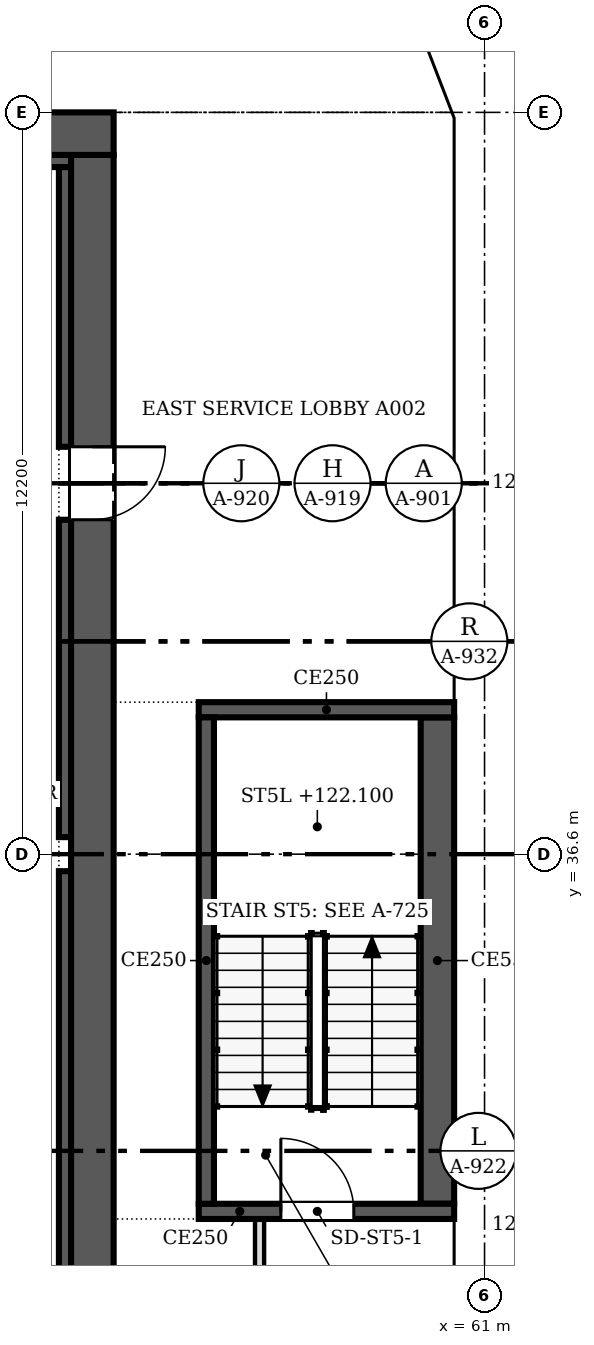
"""IFC4 building model, lengths in metres.
Left out: names, types, materials, properties, quantities, classifications, styles, units other than length and angle.
Written with IfcOpenShell. Run it as: python <this file> out.ifc"""

import sys

from ifc_helpers import new_model, si_unit, direction, frame, frame_2d, origin, place, context, subcontext, project, spatial, polyline, rectangle, outline, extrude, faceted_brep, source, transform, mapped, element, fill, save


model = new_model("IFC4")
c1 = context("Model", 3, precision=1e-05, world=origin(), true_north=direction((0.0, 1.0)))
c2 = subcontext(c1, "Body", "Model", "MODEL_VIEW")
j1 = project(units=[si_unit("LENGTHUNIT", "METRE"), si_unit("PLANEANGLEUNIT", "RADIAN")], contexts=[c1])
p1 = place(None, origin())
s1 = spatial("IfcSite", under=j1, at=p1, CompositionType="ELEMENT")
p2 = place(p1, origin())
s2 = spatial("IfcBuilding", under=s1, at=p2, CompositionType="ELEMENT")
p3 = place(p2, frame((0.0, 0.0, 120.2)))
s3 = spatial("IfcBuildingStorey", under=s2, at=p3, CompositionType="ELEMENT", Elevation=120.2)
m1 = source(origin(), c2, "Body", "SweptSolid", [
    extrude(outline(polyline([(3.05, 0.0), (6.1, 3.8), (3.05, 7.6), (0.0, 3.8), (3.05, 0.0)])), frame((0.0, 0.25, 0.0), z_axis=(0.0, -1.0, 0.0), x_axis=(1.0, 0.0, 0.0)), (0.0, 0.0, 1.0), 0.5),
])
p4 = place(p3, frame((60.75, 24.4, -3.8), z_axis=(0.0, 0.0, 1.0), x_axis=(0.0, 1.0, 0.0)))
e1 = element("IfcWall", 1, at=p4, inside=s3, PredefinedType="SOLIDWALL", context=c2, shape_type="MappedRepresentation", body=[
    mapped(m1, transform((0.0, 0.0, 0.0), scale=1.0)),
])
m2 = source(origin(), c2, "Body", "SweptSolid", [
    extrude(outline(polyline([(3.05, 0.399), (5.78, 3.8), (3.05, 7.201), (0.321, 3.8), (3.05, 0.399)])), frame((0.0, 0.26, 0.0), z_axis=(0.0, -1.0, 0.0), x_axis=(1.0, 0.0, 0.0)), (0.0, 0.0, 1.0), 0.52),
])
p5 = place(p4, origin())
e2 = element("IfcOpeningElement", 2, at=p5, cuts=e1, PredefinedType="OPENING", context=c2, shape_type="MappedRepresentation", body=[
    mapped(m2, transform((0.0, 0.0, 0.0), scale=1.0)),
])
p6 = place(p3, frame((60.75, 30.5, -3.8), z_axis=(0.0, 0.0, 1.0), x_axis=(0.0, 1.0, 0.0)))
e3 = element("IfcWall", 3, at=p6, inside=s3, PredefinedType="SOLIDWALL", context=c2, shape_type="MappedRepresentation", body=[
    mapped(m1, transform((0.0, 0.0, 0.0), scale=1.0)),
])
p7 = place(p6, origin())
e4 = element("IfcOpeningElement", 4, at=p7, cuts=e3, PredefinedType="OPENING", context=c2, shape_type="MappedRepresentation", body=[
    mapped(m2, transform((0.0, 0.0, 0.0), scale=1.0)),
])
m3 = source(origin(), c2, "Body", "Brep", [
    faceted_brep([(3.05, -0.25, 0.0), (6.1, -0.25, 3.8), (6.1, -0.25, 3.8), (3.05, -0.25, 7.6), (0.0, -0.25, 3.8), (0.0, 0.25, 3.8), (3.05, 0.25, 7.6), (6.1, 0.25, 3.8), (6.1, 0.25, 3.8), (3.05, 0.25, 0.0)], [[[0, 1, 2, 3, 4]], [[5, 6, 7, 8, 9]], [[9, 8, 1, 0]], [[7, 6, 3, 2]], [[6, 5, 4, 3]], [[5, 9, 0, 4]], [[1, 8, 7, 2]]]),
])
p8 = place(p3, frame((60.75, 36.6, -3.8), z_axis=(0.0, 0.0, 1.0), x_axis=(0.0, 1.0, 0.0)))
e5 = element("IfcWall", 5, at=p8, inside=s3, PredefinedType="SOLIDWALL", context=c2, shape_type="MappedRepresentation", body=[
    mapped(m3, transform((0.0, 0.0, 0.0), scale=1.0)),
])
p9 = place(p8, origin())
e6 = element("IfcOpeningElement", 6, at=p9, cuts=e5, PredefinedType="OPENING", context=c2, shape_type="MappedRepresentation", body=[
    mapped(m2, transform((0.0, 0.0, 0.0), scale=1.0)),
])
m4 = source(origin(), c2, "Body", "Brep", [
    faceted_brep([(3.05, -0.25, 0.0), (6.053, -0.25, 3.8), (3.05, -0.25, 7.6), (0.0, -0.25, 3.8), (0.0, 0.25, 3.8), (3.05, 0.25, 7.6), (6.007, 0.25, 3.859), (6.007, 0.25, 3.741), (3.05, 0.25, 0.0), (6.053, 0.0, 3.8)], [[[0, 1, 2, 3]], [[4, 5, 6, 7, 8]], [[8, 7, 9, 1, 0]], [[6, 5, 2, 1, 9]], [[5, 4, 3, 2]], [[4, 8, 0, 3]], [[9, 7, 6]]]),
])
p10 = place(p3, frame((60.75, 42.7, -3.8), z_axis=(0.0, 0.0, 1.0), x_axis=(0.0, 1.0, 0.0)))
e7 = element("IfcWall", 7, at=p10, inside=s3, PredefinedType="SOLIDWALL", context=c2, shape_type="MappedRepresentation", body=[
    mapped(m4, transform((0.0, 0.0, 0.0), scale=1.0)),
])
m5 = source(origin(), c2, "Body", "SweptSolid", [
    extrude(outline(polyline([(3.049, 0.401), (5.735, 3.8), (3.049, 7.199), (0.321, 3.8), (3.049, 0.401)])), frame((0.0, 0.26, 0.0), z_axis=(0.0, -1.0, 0.0), x_axis=(1.0, 0.0, 0.0)), (0.0, 0.0, 1.0), 0.52),
])
p11 = place(p10, origin())
e8 = element("IfcOpeningElement", 8, at=p11, cuts=e7, PredefinedType="OPENING", context=c2, shape_type="MappedRepresentation", body=[
    mapped(m5, transform((0.0, 0.0, 0.0), scale=1.0)),
])
m6 = source(origin(), c2, "Body", "Brep", [
    faceted_brep([(2.95, -0.25, 0.0), (3.003, -0.25, 0.068), (3.003, -0.25, 7.532), (2.95, -0.25, 7.6), (0.0, -0.25, 3.8), (0.047, 0.25, 3.86), (2.898, 0.25, 7.532), (2.898, 0.25, 0.068), (0.047, 0.25, 3.74), (2.95, 0.0, 0.0), (2.95, 0.0, 7.6), (0.0, 0.0, 3.8)], [[[0, 1, 2, 3, 4]], [[5, 6, 7, 8]], [[1, 0, 9]], [[10, 3, 2]], [[6, 5, 11, 4, 3, 10]], [[8, 7, 9, 0, 4, 11]], [[8, 11, 5]], [[1, 9, 7, 6, 10, 2]]]),
])
p12 = place(p3, frame((60.75, 48.753, -3.8), z_axis=(0.0, 0.0, 1.0), x_axis=(-0.35992665181, 0.932980602862, 0.0)))
e9 = element("IfcWall", 9, at=p12, inside=s3, PredefinedType="SOLIDWALL", context=c2, shape_type="MappedRepresentation", body=[
    mapped(m6, transform((0.0, 0.0, 0.0), scale=1.0)),
])
m7 = source(origin(), c2, "Body", "SweptSolid", [
    extrude(outline(polyline([(2.75, 6.935), (0.316, 3.8), (2.75, 0.665), (2.75, 6.935)])), frame((0.0, 0.26, 0.0), z_axis=(0.0, -1.0, 0.0), x_axis=(1.0, 0.0, 0.0)), (0.0, 0.0, 1.0), 0.52),
])
p13 = place(p12, origin())
e10 = element("IfcOpeningElement", 10, at=p13, cuts=e9, PredefinedType="OPENING", context=c2, shape_type="MappedRepresentation", body=[
    mapped(m7, transform((0.0, 0.0, 0.0), scale=1.0)),
])
p14 = place(p2, frame((0.0, 0.0, 124.0)))
s4 = spatial("IfcBuildingStorey", under=s2, at=p14, CompositionType="ELEMENT", Elevation=124.0)
p15 = place(p14, frame((60.75, 27.45, -3.8), z_axis=(0.0, 0.0, 1.0), x_axis=(0.0, 1.0, 0.0)))
e11 = element("IfcWall", 11, at=p15, inside=s4, PredefinedType="SOLIDWALL", context=c2, shape_type="MappedRepresentation", body=[
    mapped(m1, transform((0.0, 0.0, 0.0), scale=1.0)),
])
p16 = place(p15, origin())
e12 = element("IfcOpeningElement", 12, at=p16, cuts=e11, PredefinedType="OPENING", context=c2, shape_type="MappedRepresentation", body=[
    mapped(m2, transform((0.0, 0.0, 0.0), scale=1.0)),
])
p17 = place(p14, frame((60.75, 33.55, -3.8), z_axis=(0.0, 0.0, 1.0), x_axis=(0.0, 1.0, 0.0)))
e13 = element("IfcWall", 13, at=p17, inside=s4, PredefinedType="SOLIDWALL", context=c2, shape_type="MappedRepresentation", body=[
    mapped(m3, transform((0.0, 0.0, 0.0), scale=1.0)),
])
p18 = place(p17, origin())
e14 = element("IfcOpeningElement", 14, at=p18, cuts=e13, PredefinedType="OPENING", context=c2, shape_type="MappedRepresentation", body=[
    mapped(m2, transform((0.0, 0.0, 0.0), scale=1.0)),
])
p19 = place(p14, frame((60.75, 39.65, -3.8), z_axis=(0.0, 0.0, 1.0), x_axis=(0.0, 1.0, 0.0)))
e15 = element("IfcWall", 15, at=p19, inside=s4, PredefinedType="SOLIDWALL", context=c2, shape_type="MappedRepresentation", body=[
    mapped(m1, transform((0.0, 0.0, 0.0), scale=1.0)),
])
p20 = place(p19, origin())
e16 = element("IfcOpeningElement", 16, at=p20, cuts=e15, PredefinedType="OPENING", context=c2, shape_type="MappedRepresentation", body=[
    mapped(m2, transform((0.0, 0.0, 0.0), scale=1.0)),
])
m8 = source(origin(), c2, "Body", "Brep", [
    faceted_brep([(3.003, -0.25, 0.0), (3.05, -0.25, 0.06), (3.05, -0.25, 7.54), (3.003, -0.25, 7.6), (0.0, -0.25, 3.8), (0.0, 0.25, 3.8), (2.957, 0.25, 7.541), (2.957, 0.25, 0.059), (3.003, 0.0, 0.0), (3.003, 0.0, 7.6)], [[[0, 1, 2, 3, 4]], [[5, 6, 7]], [[1, 0, 8]], [[9, 3, 2]], [[6, 5, 4, 3, 9]], [[5, 7, 8, 0, 4]], [[1, 8, 7, 6, 9, 2]]]),
])
p21 = place(p14, frame((60.75, 45.75, -3.8), z_axis=(0.0, 0.0, 1.0), x_axis=(0.0, 1.0, 0.0)))
e17 = element("IfcWall", 17, at=p21, inside=s4, PredefinedType="SOLIDWALL", context=c2, shape_type="MappedRepresentation", body=[
    mapped(m8, transform((0.0, 0.0, 0.0), scale=1.0)),
])
m9 = source(origin(), c2, "Body", "SweptSolid", [
    extrude(outline(polyline([(2.803, 6.944), (0.319, 3.8), (2.803, 0.656), (2.803, 6.944)])), frame((0.0, 0.26, 0.0), z_axis=(0.0, -1.0, 0.0), x_axis=(1.0, 0.0, 0.0)), (0.0, 0.0, 1.0), 0.52),
])
p22 = place(p21, origin())
e18 = element("IfcOpeningElement", 18, at=p22, cuts=e17, PredefinedType="OPENING", context=c2, shape_type="MappedRepresentation", body=[
    mapped(m9, transform((0.0, 0.0, 0.0), scale=1.0)),
])
m10 = source(origin(), c2, "Body", "Brep", [
    faceted_brep([(0.047, -0.25, 0.0), (2.997, -0.25, 3.8), (0.047, -0.25, 7.6), (0.0, -0.25, 7.541), (0.0, -0.25, 0.059), (0.093, 0.25, 7.54), (2.944, 0.25, 3.868), (2.944, 0.25, 3.732), (0.093, 0.25, 0.06), (2.997, 0.0, 3.8), (0.047, 0.0, 0.0), (0.047, 0.0, 7.6)], [[[0, 1, 2, 3, 4]], [[5, 6, 7, 8]], [[8, 7, 9, 1, 0, 10]], [[6, 5, 11, 2, 1, 9]], [[3, 2, 11]], [[10, 0, 4]], [[8, 10, 4, 3, 11, 5]], [[9, 7, 6]]]),
])
p23 = place(p14, frame((60.767, 48.71, -3.8), z_axis=(0.0, 0.0, 1.0), x_axis=(-0.359901446078, 0.932990326376, 0.0)))
e19 = element("IfcWall", 19, at=p23, inside=s4, PredefinedType="SOLIDWALL", context=c2, shape_type="MappedRepresentation", body=[
    mapped(m10, transform((0.0, 0.0, 0.0), scale=1.0)),
])
m11 = source(origin(), c2, "Body", "SweptSolid", [
    extrude(outline(polyline([(0.247, 0.665), (2.681, 3.8), (0.247, 6.935), (0.247, 0.665)])), frame((0.0, 0.26, 0.0), z_axis=(0.0, -1.0, 0.0), x_axis=(1.0, 0.0, 0.0)), (0.0, 0.0, 1.0), 0.52),
])
p24 = place(p23, origin())
e20 = element("IfcOpeningElement", 20, at=p24, cuts=e19, PredefinedType="OPENING", context=c2, shape_type="MappedRepresentation", body=[
    mapped(m11, transform((0.0, 0.0, 0.0), scale=1.0)),
])
p25 = place(p3, frame((30.5, 48.45, 0.0), z_axis=(0.0, 0.0, 1.0), x_axis=(1.0, 0.0, 0.0)))
e21 = element("IfcWall", 21, at=p25, inside=s3, PredefinedType="SHEAR", context=c2, shape_type="SweptSolid", body=[
    extrude(rectangle(XDim=24.4, YDim=0.7, at=frame_2d((12.2, 0.0))), origin(), (0.0, 0.0, 1.0), 3.8),
])
p26 = place(p3, frame((54.55, 48.1, 0.0), z_axis=(0.0, 0.0, 1.0), x_axis=(0.0, -1.0, 0.0)))
e22 = element("IfcWall", 22, at=p26, inside=s3, PredefinedType="SHEAR", context=c2, shape_type="SweptSolid", body=[
    extrude(rectangle(XDim=23.0, YDim=0.7, at=frame_2d((11.5, 0.0))), origin(), (0.0, 0.0, 1.0), 3.8),
])
m12 = source(origin(), c2, "Body", "SweptSolid", [
    extrude(rectangle(XDim=1.2, YDim=2.1, at=frame_2d((0.6, 1.05))), frame((0.0, 0.36, 0.0), z_axis=(0.0, -1.0, 0.0), x_axis=(1.0, 0.0, 0.0)), (0.0, 0.0, 1.0), 0.72),
])
p27 = place(p26, frame((4.8, 0.0, 0.0)))
e23 = element("IfcOpeningElement", 23, at=p27, cuts=e22, PredefinedType="OPENING", context=c2, shape_type="MappedRepresentation", body=[
    mapped(m12, transform((0.0, 0.0, 0.0), scale=1.0)),
])
p28 = place(p3, frame((31.2, 48.0, 0.0), z_axis=(0.0, 0.0, 1.0), x_axis=(1.0, 0.0, 0.0)))
e24 = element("IfcWall", 24, at=p28, inside=s3, PredefinedType="SOLIDWALL", context=c2, shape_type="SweptSolid", body=[
    extrude(rectangle(XDim=23.0, YDim=0.2, at=frame_2d((11.5, 0.0))), origin(), (0.0, 0.0, 1.0), 3.8),
])
p29 = place(p3, frame((54.1, 25.3, 0.0), z_axis=(0.0, 0.0, 1.0), x_axis=(0.0, 1.0, 0.0)))
e25 = element("IfcWall", 25, at=p29, inside=s3, PredefinedType="SOLIDWALL", context=c2, shape_type="SweptSolid", body=[
    extrude(rectangle(XDim=11.02, YDim=0.2, at=frame_2d((5.51, 0.0))), origin(), (0.0, 0.0, 1.0), 3.8),
])
p30 = place(p3, frame((54.1, 36.88, 0.0), z_axis=(0.0, 0.0, 1.0), x_axis=(0.0, 1.0, 0.0)))
e26 = element("IfcWall", 26, at=p30, inside=s3, PredefinedType="SOLIDWALL", context=c2, shape_type="SweptSolid", body=[
    extrude(rectangle(XDim=5.22, YDim=0.2, at=frame_2d((2.61, 0.0))), origin(), (0.0, 0.0, 1.0), 3.8),
])
p31 = place(p3, frame((54.1, 43.3, 0.0), z_axis=(0.0, 0.0, 1.0), x_axis=(0.0, 1.0, 0.0)))
e27 = element("IfcWall", 27, at=p31, inside=s3, PredefinedType="SOLIDWALL", context=c2, shape_type="SweptSolid", body=[
    extrude(rectangle(XDim=4.6, YDim=0.2, at=frame_2d((2.3, 0.0))), origin(), (0.0, 0.0, 1.0), 3.8),
])
p32 = place(p3, frame((60.5, 30.725, 0.0), z_axis=(0.0, 0.0, 1.0), x_axis=(-1.0, 0.0, 0.0)))
e28 = element("IfcWall", 28, at=p32, inside=s3, PredefinedType="SOLIDWALL", context=c2, shape_type="SweptSolid", body=[
    extrude(rectangle(XDim=4.2, YDim=0.25, at=frame_2d((2.1, 0.0))), origin(), (0.0, 0.0, 1.0), 3.8),
])
m13 = source(origin(), c2, "Body", "SweptSolid", [
    extrude(rectangle(XDim=1.2, YDim=2.1, at=frame_2d((0.6, 1.05))), frame((0.0, 0.135, 0.0), z_axis=(0.0, -1.0, 0.0), x_axis=(1.0, 0.0, 0.0)), (0.0, 0.0, 1.0), 0.27),
])
p33 = place(p32, frame((1.65, 0.0, 0.0)))
e29 = element("IfcOpeningElement", 29, at=p33, cuts=e28, PredefinedType="OPENING", context=c2, shape_type="MappedRepresentation", body=[
    mapped(m13, transform((0.0, 0.0, 0.0), scale=1.0)),
])
p34 = place(p3, frame((56.425, 30.85, 0.0), z_axis=(0.0, 0.0, 1.0), x_axis=(0.0, 1.0, 0.0)))
e30 = element("IfcWall", 30, at=p34, inside=s3, PredefinedType="SOLIDWALL", context=c2, shape_type="SweptSolid", body=[
    extrude(rectangle(XDim=8.0, YDim=0.25, at=frame_2d((4.0, 0.0))), origin(), (0.0, 0.0, 1.0), 3.8),
])
p35 = place(p3, frame((56.3, 38.975, 0.0), z_axis=(0.0, 0.0, 1.0), x_axis=(1.0, 0.0, 0.0)))
e31 = element("IfcWall", 31, at=p35, inside=s3, PredefinedType="SOLIDWALL", context=c2, shape_type="SweptSolid", body=[
    extrude(rectangle(XDim=4.2, YDim=0.25, at=frame_2d((2.1, 0.0))), origin(), (0.0, 0.0, 1.0), 3.8),
])
p36 = place(p3, frame((60.225, 38.85, 0.0), z_axis=(0.0, 0.0, 1.0), x_axis=(0.0, -1.0, 0.0)))
e32 = element("IfcWall", 32, at=p36, inside=s3, PredefinedType="SOLIDWALL", context=c2, shape_type="SweptSolid", body=[
    extrude(rectangle(XDim=8.0, YDim=0.55, at=frame_2d((4.0, 0.0))), origin(), (0.0, 0.0, 1.0), 3.8),
])
p37 = place(p3, frame((57.3, 30.6, 0.0), z_axis=(0.0, 0.0, 1.0), x_axis=(0.0, -1.0, 0.0)))
e33 = element("IfcWall", 33, at=p37, inside=s3, PredefinedType="PARTITIONING", context=c2, shape_type="SweptSolid", body=[
    extrude(rectangle(XDim=8.524, YDim=0.15, at=frame_2d((4.262, 0.0))), origin(), (0.0, 0.0, 1.0), 3.067),
])
m14 = source(origin(), c2, "Body", "SweptSolid", [
    extrude(rectangle(XDim=0.9, YDim=2.1, at=frame_2d((0.45, 1.05))), frame((0.0, 0.085, 0.0), z_axis=(0.0, -1.0, 0.0), x_axis=(1.0, 0.0, 0.0)), (0.0, 0.0, 1.0), 0.17),
])
p38 = place(p37, frame((3.824, 0.0, 0.0)))
e34 = element("IfcOpeningElement", 34, at=p38, cuts=e33, PredefinedType="OPENING", context=c2, shape_type="MappedRepresentation", body=[
    mapped(m14, transform((0.0, 0.0, 0.0), scale=1.0)),
])
m15 = source(origin(), c2, "Body", "SweptSolid", [
    extrude(rectangle(XDim=1.2, YDim=2.1, at=frame_2d((0.6, 1.05))), frame((0.0, 0.025, 0.0), z_axis=(0.0, -1.0, 0.0), x_axis=(1.0, 0.0, 0.0)), (0.0, 0.0, 1.0), 0.05),
])
p39 = place(p27, origin())
e35 = element("IfcDoor", 35, at=p39, inside=s3, OperationType="SINGLE_SWING_LEFT", PredefinedType="DOOR", context=c2, shape_type="MappedRepresentation", body=[
    mapped(m15, transform((0.0, 0.0, 0.0), scale=1.0)),
])
fill(e23, e35)
p40 = place(p33, origin())
e36 = element("IfcDoor", 36, at=p40, inside=s3, OperationType="SINGLE_SWING_RIGHT", PredefinedType="DOOR", context=c2, shape_type="MappedRepresentation", body=[
    mapped(m15, transform((0.0, 0.0, 0.0), scale=1.0)),
])
fill(e29, e36)
save(model, sys.argv[1])
